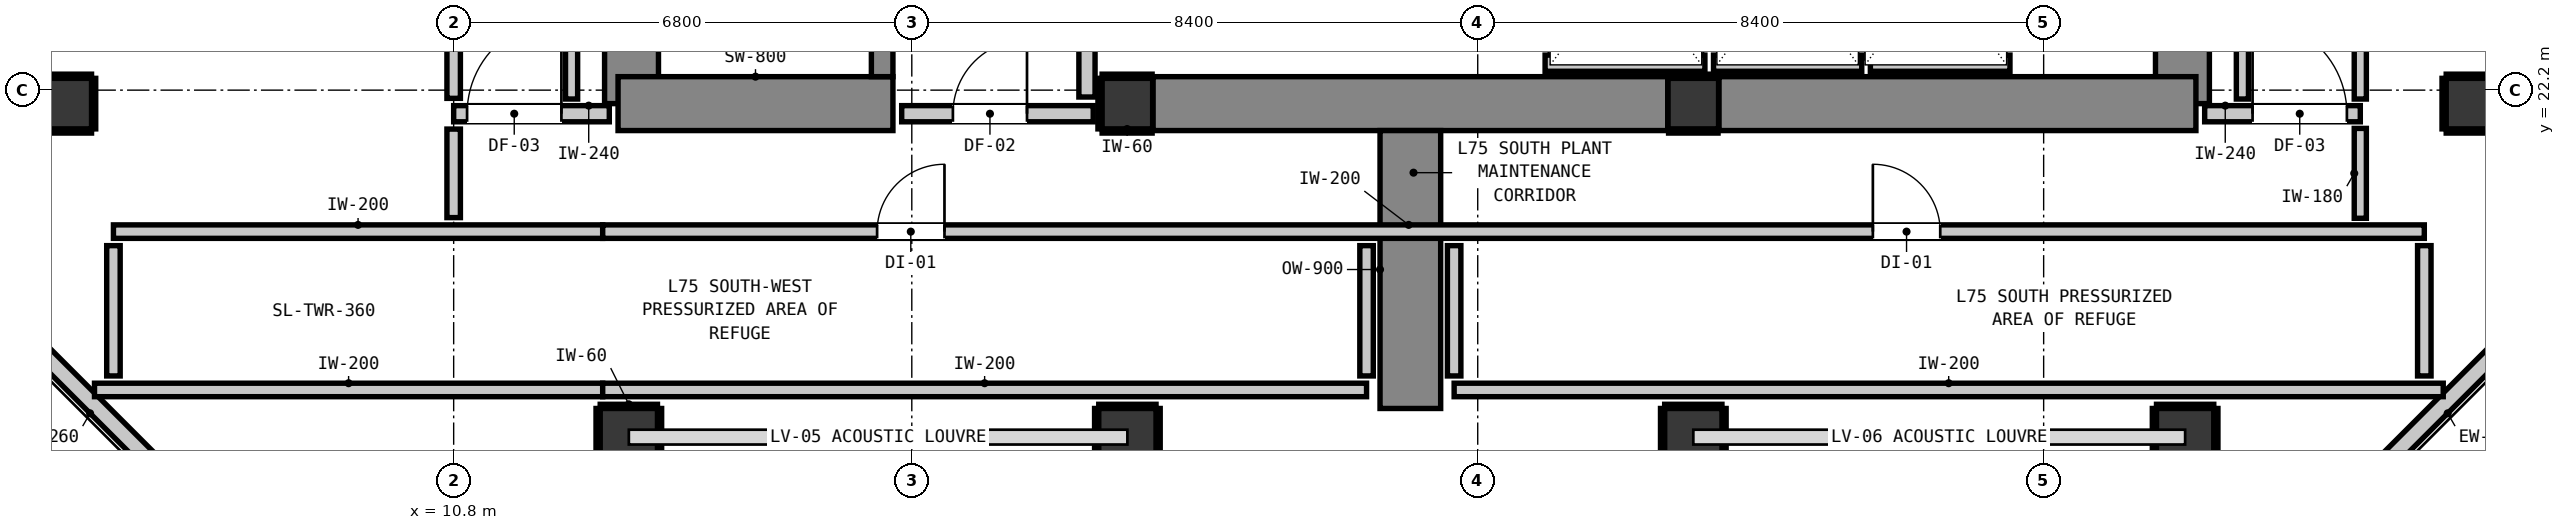
"""IFC4 building model, lengths in metres.
Left out: names, types, materials, properties, quantities, classifications, styles, units other than length and angle.
Written with IfcOpenShell. Run it as: python <this file> out.ifc"""

import sys

from ifc_helpers import new_model, si_unit, direction, frame, frame_2d, origin, origin_2d, place, context, subcontext, project, spatial, rectangle, extrude, element, fill, save


model = new_model("IFC4")
c1 = context("Model", 3, precision=1e-05, world=origin(), true_north=direction((0.0, 1.0)))
c2 = subcontext(c1, "Body", "Model", "MODEL_VIEW")
j1 = project(units=[si_unit("LENGTHUNIT", "METRE"), si_unit("PLANEANGLEUNIT", "RADIAN")], contexts=[c1])
p1 = place(None, origin())
s1 = spatial("IfcSite", under=j1, at=p1, CompositionType="ELEMENT")
p2 = place(p1, origin())
s2 = spatial("IfcBuilding", under=s1, at=p2, CompositionType="ELEMENT")
p3 = place(p2, frame((0.0, 0.0, 257.84)))
s3 = spatial("IfcBuildingStorey", under=s2, at=p3, CompositionType="ELEMENT", Elevation=257.84)
for number, where, z_axis, x_axis in (
    (1, (20.8, 22.0, 0.0), (0.0, 0.0, 1.0), (1.0, 0.0, 0.0)),
    (2, (29.2, 22.0, 0.0), (0.0, 0.0, 1.0), (1.0, 0.0, 0.0)),
):
    element("IfcColumn", number, at=place(p3, frame(where, z_axis=z_axis, x_axis=x_axis)), inside=s3, PredefinedType="COLUMN", context=c2, shape_type="SweptSolid", body=[
        extrude(rectangle(XDim=0.75, YDim=0.75, at=origin_2d()), origin(), (0.0, 0.0, 1.0), 4.4),
    ])
p4 = place(p3, frame((13.44, 22.0, 0.0), z_axis=(0.0, 0.0, 1.0), x_axis=(0.0, 1.0, 0.0)))
e3 = element("IfcWall", 3, at=p4, inside=s3, PredefinedType="SHEAR", context=c2, shape_type="SweptSolid", body=[
    extrude(rectangle(XDim=8.32, YDim=0.8, at=frame_2d((4.16, 0.0))), origin(), (0.0, 0.0, 1.0), 4.4),
])
p5 = place(p3, frame((13.24, 22.0, 0.0), z_axis=(0.0, 0.0, 1.0), x_axis=(1.0, 0.0, 0.0)))
e4 = element("IfcWall", 4, at=p5, inside=s3, PredefinedType="SHEAR", context=c2, shape_type="SweptSolid", body=[
    extrude(rectangle(XDim=4.08, YDim=0.8, at=frame_2d((2.04, 0.0))), origin(), (0.0, 0.0, 1.0), 4.4),
])
p6 = place(p3, frame((36.46, 22.0, 0.0), z_axis=(0.0, 0.0, 1.0), x_axis=(0.0, 1.0, 0.0)))
e5 = element("IfcWall", 5, at=p6, inside=s3, PredefinedType="SHEAR", context=c2, shape_type="SweptSolid", body=[
    extrude(rectangle(XDim=8.32, YDim=0.8, at=frame_2d((4.16, 0.0))), origin(), (0.0, 0.0, 1.0), 4.4),
])
p7 = place(p3, frame((29.58, 22.0, 0.0), z_axis=(0.0, 0.0, 1.0), x_axis=(1.0, 0.0, 0.0)))
e6 = element("IfcWall", 6, at=p7, inside=s3, PredefinedType="SHEAR", context=c2, shape_type="SweptSolid", body=[
    extrude(rectangle(XDim=7.08, YDim=0.8, at=frame_2d((3.54, 0.0))), origin(), (0.0, 0.0, 1.0), 4.4),
])
p8 = place(p3, frame((21.18, 22.0, 0.0), z_axis=(0.0, 0.0, 1.0), x_axis=(1.0, 0.0, 0.0)))
e7 = element("IfcWall", 7, at=p8, inside=s3, PredefinedType="SHEAR", context=c2, shape_type="SweptSolid", body=[
    extrude(rectangle(XDim=7.64, YDim=0.8, at=frame_2d((3.82, 0.0))), origin(), (0.0, 0.0, 1.0), 4.4),
])
p9 = place(p3, frame((17.16, 22.4, 0.0), z_axis=(0.0, 0.0, 1.0), x_axis=(0.0, 1.0, 0.0)))
e8 = element("IfcWall", 8, at=p9, inside=s3, PredefinedType="SHEAR", context=c2, shape_type="SweptSolid", body=[
    extrude(rectangle(XDim=8.0, YDim=0.32, at=frame_2d((4.0, 0.0))), origin(), (0.0, 0.0, 1.0), 4.4),
])
p10 = place(p9, frame((0.39, 0.0, 0.0)))
e9 = element("IfcOpeningElement", 9, at=p10, cuts=e8, PredefinedType="OPENING", context=c2, shape_type="SweptSolid", body=[
    extrude(rectangle(XDim=1.1, YDim=2.15, at=frame_2d((0.55, 1.075))), frame((0.0, 0.17, 0.0), z_axis=(0.0, -1.0, 0.0), x_axis=(1.0, 0.0, 0.0)), (0.0, 0.0, 1.0), 0.34),
])
for number, where, z_axis, x_axis in (
    (10, (13.4, 17.05, 0.0), (0.0, 0.0, 1.0), (1.0, 0.0, 0.0)),
    (11, (20.8, 17.05, 0.0), (0.0, 0.0, 1.0), (1.0, 0.0, 0.0)),
    (12, (29.2, 17.05, 0.0), (0.0, 0.0, 1.0), (1.0, 0.0, 0.0)),
    (13, (36.5, 17.05, 0.0), (0.0, 0.0, 1.0), (1.0, 0.0, 0.0)),
):
    element("IfcColumn", number, at=place(p3, frame(where, z_axis=z_axis, x_axis=x_axis)), inside=s3, PredefinedType="COLUMN", context=c2, shape_type="SweptSolid", body=[
        extrude(rectangle(XDim=0.85, YDim=0.85, at=origin_2d()), origin(), (0.0, 0.0, 1.0), 4.4),
    ])
for number, where, z_axis, x_axis in (
    (14, (5.05, 22.0, 0.0), (0.0, 0.0, 1.0), (1.0, 0.0, 0.0)),
    (15, (40.75, 22.0, 0.0), (0.0, 0.0, 1.0), (1.0, 0.0, 0.0)),
):
    element("IfcColumn", number, at=place(p3, frame(where, z_axis=z_axis, x_axis=x_axis)), inside=s3, PredefinedType="COLUMN", context=c2, shape_type="SweptSolid", body=[
        extrude(rectangle(XDim=0.75, YDim=0.75, at=origin_2d()), origin(), (0.0, 0.0, 1.0), 4.4),
    ])
p11 = place(p3, frame((25.0, 17.475, 0.0), z_axis=(0.0, 0.0, 1.0), x_axis=(0.0, 1.0, 0.0)))
e16 = element("IfcWall", 16, at=p11, inside=s3, PredefinedType="SHEAR", context=c2, shape_type="SweptSolid", body=[
    extrude(rectangle(XDim=4.125, YDim=0.9, at=frame_2d((2.062, 0.0))), origin(), (0.0, 0.0, 1.0), 4.18),
])
for number, where, z_axis, x_axis in (
    (17, (41.355, 18.545, 0.0), (0.0, 0.0, 1.0), (-0.707, -0.707, 0.0)),
    (18, (6.545, 16.445, 0.0), (0.0, 0.0, 1.0), (-0.707, 0.707, 0.0)),
):
    element("IfcWall", number, at=place(p3, frame(where, z_axis=z_axis, x_axis=x_axis)), inside=s3, PredefinedType="STANDARD", context=c2, shape_type="SweptSolid", body=[
        extrude(rectangle(XDim=2.97, YDim=0.26, at=frame_2d((1.485, 0.0))), origin(), (0.0, 0.0, 1.0), 4.18),
    ])
p12 = place(p3, frame((29.5, 22.6, 0.0), z_axis=(0.0, 0.0, 1.0), x_axis=(1.0, 0.0, 0.0)))
e19 = element("IfcWall", 19, at=p12, inside=s3, PredefinedType="PARTITIONING", context=c2, shape_type="SweptSolid", body=[
    extrude(rectangle(XDim=2.2, YDim=0.24, at=frame_2d((1.1, 0.0))), origin(), (0.0, 0.0, 1.0), 4.18),
])
p13 = place(p3, frame((31.828, 22.6, 0.0), z_axis=(0.0, 0.0, 1.0), x_axis=(1.0, 0.0, 0.0)))
e20 = element("IfcWall", 20, at=p13, inside=s3, PredefinedType="PARTITIONING", context=c2, shape_type="SweptSolid", body=[
    extrude(rectangle(XDim=2.072, YDim=0.24, at=frame_2d((1.036, 0.0))), origin(), (0.0, 0.0, 1.0), 4.18),
])
p14 = place(p3, frame((27.0, 22.6, 0.0), z_axis=(0.0, 0.0, 1.0), x_axis=(1.0, 0.0, 0.0)))
e21 = element("IfcWall", 21, at=p14, inside=s3, PredefinedType="PARTITIONING", context=c2, shape_type="SweptSolid", body=[
    extrude(rectangle(XDim=2.372, YDim=0.24, at=frame_2d((1.186, 0.0))), origin(), (0.0, 0.0, 1.0), 4.18),
])
p15 = place(p3, frame((10.8, 21.85, 0.0), z_axis=(0.0, 0.0, 1.0), x_axis=(1.0, 0.0, 0.0)))
e22 = element("IfcWall", 22, at=p15, inside=s3, PredefinedType="PARTITIONING", context=c2, shape_type="SweptSolid", body=[
    extrude(rectangle(XDim=2.31, YDim=0.24, at=frame_2d((1.155, 0.0))), origin(), (0.0, 0.0, 1.0), 3.807),
])
p16 = place(p15, frame((0.199, 0.0, 0.0)))
e23 = element("IfcOpeningElement", 23, at=p16, cuts=e22, PredefinedType="OPENING", context=c2, shape_type="SweptSolid", body=[
    extrude(rectangle(XDim=1.4, YDim=2.15, at=frame_2d((0.7, 1.075))), frame((0.0, 0.13, 0.0), z_axis=(0.0, -1.0, 0.0), x_axis=(1.0, 0.0, 0.0)), (0.0, 0.0, 1.0), 0.26),
])
p17 = place(p3, frame((17.45, 21.85, 0.0), z_axis=(0.0, 0.0, 1.0), x_axis=(1.0, 0.0, 0.0)))
e24 = element("IfcWall", 24, at=p17, inside=s3, PredefinedType="PARTITIONING", context=c2, shape_type="SweptSolid", body=[
    extrude(rectangle(XDim=2.843, YDim=0.24, at=frame_2d((1.421, 0.0))), origin(), (0.0, 0.0, 1.0), 3.807),
])
p18 = place(p17, frame((0.76, 0.0, 0.0)))
e25 = element("IfcOpeningElement", 25, at=p18, cuts=e24, PredefinedType="OPENING", context=c2, shape_type="SweptSolid", body=[
    extrude(rectangle(XDim=1.1, YDim=2.15, at=frame_2d((0.55, 1.075))), frame((0.0, 0.13, 0.0), z_axis=(0.0, -1.0, 0.0), x_axis=(1.0, 0.0, 0.0)), (0.0, 0.0, 1.0), 0.26),
])
p19 = place(p3, frame((36.79, 21.85, 0.0), z_axis=(0.0, 0.0, 1.0), x_axis=(1.0, 0.0, 0.0)))
e26 = element("IfcWall", 26, at=p19, inside=s3, PredefinedType="PARTITIONING", context=c2, shape_type="SweptSolid", body=[
    extrude(rectangle(XDim=2.31, YDim=0.24, at=frame_2d((1.155, 0.0))), origin(), (0.0, 0.0, 1.0), 3.807),
])
p20 = place(p19, frame((0.711, 0.0, 0.0)))
e27 = element("IfcOpeningElement", 27, at=p20, cuts=e26, PredefinedType="OPENING", context=c2, shape_type="SweptSolid", body=[
    extrude(rectangle(XDim=1.4, YDim=2.15, at=frame_2d((0.7, 1.075))), frame((0.0, 0.13, 0.0), z_axis=(0.0, -1.0, 0.0), x_axis=(1.0, 0.0, 0.0)), (0.0, 0.0, 1.0), 0.26),
])
p21 = place(p3, frame((5.469, 17.75, 0.0), z_axis=(0.0, 0.0, 1.0), x_axis=(1.0, 0.0, 0.0)))
e28 = element("IfcWall", 28, at=p21, inside=s3, PredefinedType="PARTITIONING", context=c2, shape_type="SweptSolid", body=[
    extrude(rectangle(XDim=7.543, YDim=0.2, at=frame_2d((3.771, 0.0))), origin(), (0.0, 0.0, 1.0), 3.557),
])
p22 = place(p3, frame((13.012, 17.75, 0.0), z_axis=(0.0, 0.0, 1.0), x_axis=(1.0, 0.0, 0.0)))
e29 = element("IfcWall", 29, at=p22, inside=s3, PredefinedType="PARTITIONING", context=c2, shape_type="SweptSolid", body=[
    extrude(rectangle(XDim=11.338, YDim=0.2, at=frame_2d((5.669, 0.0))), origin(), (0.0, 0.0, 1.0), 4.18),
])
p23 = place(p3, frame((25.65, 17.75, 0.0), z_axis=(0.0, 0.0, 1.0), x_axis=(1.0, 0.0, 0.0)))
e30 = element("IfcWall", 30, at=p23, inside=s3, PredefinedType="PARTITIONING", context=c2, shape_type="SweptSolid", body=[
    extrude(rectangle(XDim=14.681, YDim=0.2, at=frame_2d((7.341, 0.0))), origin(), (0.0, 0.0, 1.0), 4.18),
])
p24 = place(p3, frame((5.75, 20.1, 0.0), z_axis=(0.0, 0.0, 1.0), x_axis=(1.0, 0.0, 0.0)))
e31 = element("IfcWall", 31, at=p24, inside=s3, PredefinedType="PARTITIONING", context=c2, shape_type="SweptSolid", body=[
    extrude(rectangle(XDim=7.262, YDim=0.2, at=frame_2d((3.631, 0.0))), origin(), (0.0, 0.0, 1.0), 3.557),
])
p25 = place(p3, frame((13.012, 20.1, 0.0), z_axis=(0.0, 0.0, 1.0), x_axis=(1.0, 0.0, 0.0)))
e32 = element("IfcWall", 32, at=p25, inside=s3, PredefinedType="PARTITIONING", context=c2, shape_type="SweptSolid", body=[
    extrude(rectangle(XDim=27.038, YDim=0.2, at=frame_2d((13.519, 0.0))), origin(), (0.0, 0.0, 1.0), 4.18),
])
p26 = place(p25, frame((18.853, 0.0, 0.0)))
e33 = element("IfcOpeningElement", 33, at=p26, cuts=e32, PredefinedType="OPENING", context=c2, shape_type="SweptSolid", body=[
    extrude(rectangle(XDim=1.0, YDim=2.15, at=frame_2d((0.5, 1.075))), frame((0.0, 0.11, 0.0), z_axis=(0.0, -1.0, 0.0), x_axis=(1.0, 0.0, 0.0)), (0.0, 0.0, 1.0), 0.22),
])
p27 = place(p25, frame((4.073, 0.0, 0.0)))
e34 = element("IfcOpeningElement", 34, at=p27, cuts=e32, PredefinedType="OPENING", context=c2, shape_type="SweptSolid", body=[
    extrude(rectangle(XDim=1.0, YDim=2.15, at=frame_2d((0.5, 1.075))), frame((0.0, 0.11, 0.0), z_axis=(0.0, -1.0, 0.0), x_axis=(1.0, 0.0, 0.0)), (0.0, 0.0, 1.0), 0.22),
])
p28 = place(p3, frame((20.2, 22.098, 0.0), z_axis=(0.0, 0.0, 1.0), x_axis=(0.0, 1.0, 0.0)))
e35 = element("IfcWall", 35, at=p28, inside=s3, PredefinedType="PARTITIONING", context=c2, shape_type="SweptSolid", body=[
    extrude(rectangle(XDim=6.054, YDim=0.24, at=frame_2d((3.027, 0.0))), origin(), (0.0, 0.0, 1.0), 4.18),
])
p29 = place(p3, frame((5.75, 17.958, 0.0), z_axis=(0.0, 0.0, 1.0), x_axis=(0.0, 1.0, 0.0)))
e36 = element("IfcWall", 36, at=p29, inside=s3, PredefinedType="PARTITIONING", context=c2, shape_type="SweptSolid", body=[
    extrude(rectangle(XDim=1.934, YDim=0.2, at=frame_2d((0.967, 0.0))), origin(), (0.0, 0.0, 1.0), 4.18),
])
p30 = place(p3, frame((10.8, 20.308, 0.0), z_axis=(0.0, 0.0, 1.0), x_axis=(0.0, 1.0, 0.0)))
e37 = element("IfcWall", 37, at=p30, inside=s3, PredefinedType="PARTITIONING", context=c2, shape_type="SweptSolid", body=[
    extrude(rectangle(XDim=1.314, YDim=0.2, at=frame_2d((0.657, 0.0))), origin(), (0.0, 0.0, 1.0), 4.18),
])
p31 = place(p3, frame((10.8, 22.078, 0.0), z_axis=(0.0, 0.0, 1.0), x_axis=(0.0, 1.0, 0.0)))
e38 = element("IfcWall", 38, at=p31, inside=s3, PredefinedType="PARTITIONING", context=c2, shape_type="SweptSolid", body=[
    extrude(rectangle(XDim=0.914, YDim=0.2, at=frame_2d((0.457, 0.0))), origin(), (0.0, 0.0, 1.0), 4.18),
])
for number, where, z_axis, x_axis in (
    (39, (24.35, 17.958, 0.0), (0.0, 0.0, 1.0), (0.0, 1.0, 0.0)),
    (40, (25.65, 17.958, 0.0), (0.0, 0.0, 1.0), (0.0, 1.0, 0.0)),
    (41, (40.05, 17.958, 0.0), (0.0, 0.0, 1.0), (0.0, 1.0, 0.0)),
):
    element("IfcWall", number, at=place(p3, frame(where, z_axis=z_axis, x_axis=x_axis)), inside=s3, PredefinedType="PARTITIONING", context=c2, shape_type="SweptSolid", body=[
        extrude(rectangle(XDim=1.934, YDim=0.2, at=frame_2d((0.967, 0.0))), origin(), (0.0, 0.0, 1.0), 4.18),
    ])
for number, where, z_axis, x_axis in (
    (42, (12.55, 22.068, 0.0), (0.0, 0.0, 1.0), (0.0, 1.0, 0.0)),
    (43, (37.35, 22.068, 0.0), (0.0, 0.0, 1.0), (0.0, 1.0, 0.0)),
):
    element("IfcWall", number, at=place(p3, frame(where, z_axis=z_axis, x_axis=x_axis)), inside=s3, PredefinedType="PARTITIONING", context=c2, shape_type="SweptSolid", body=[
        extrude(rectangle(XDim=17.294, YDim=0.18, at=frame_2d((8.647, 0.0))), origin(), (0.0, 0.0, 1.0), 4.18),
    ])
p32 = place(p3, frame((39.1, 20.298, 0.0), z_axis=(0.0, 0.0, 1.0), x_axis=(0.0, 1.0, 0.0)))
e44 = element("IfcWall", 44, at=p32, inside=s3, PredefinedType="PARTITIONING", context=c2, shape_type="SweptSolid", body=[
    extrude(rectangle(XDim=1.334, YDim=0.18, at=frame_2d((0.667, 0.0))), origin(), (0.0, 0.0, 1.0), 4.18),
])
p33 = place(p3, frame((39.1, 22.068, 0.0), z_axis=(0.0, 0.0, 1.0), x_axis=(0.0, 1.0, 0.0)))
e45 = element("IfcWall", 45, at=p33, inside=s3, PredefinedType="PARTITIONING", context=c2, shape_type="SweptSolid", body=[
    extrude(rectangle(XDim=17.294, YDim=0.18, at=frame_2d((8.647, 0.0))), origin(), (0.0, 0.0, 1.0), 4.18),
])
for number, where, z_axis, x_axis in (
    (46, (20.425, 21.593, 0.0), (0.0, 0.0, 1.0), (1.0, 0.0, 0.0)),
    (47, (20.425, 22.407, 0.0), (0.0, 0.0, 1.0), (1.0, 0.0, 0.0)),
):
    element("IfcWall", number, at=place(p3, frame(where, z_axis=z_axis, x_axis=x_axis)), inside=s3, PredefinedType="PARTITIONING", context=c2, shape_type="SweptSolid", body=[
        extrude(rectangle(XDim=0.742, YDim=0.06, at=frame_2d((0.371, 0.0))), origin(), (0.0, 0.0, 1.0), 1.45),
    ])
p34 = place(p3, frame((20.393, 21.625, 0.0), z_axis=(0.0, 0.0, 1.0), x_axis=(0.0, 1.0, 0.0)))
e48 = element("IfcWall", 48, at=p34, inside=s3, PredefinedType="PARTITIONING", context=c2, shape_type="SweptSolid", body=[
    extrude(rectangle(XDim=0.75, YDim=0.06, at=frame_2d((0.375, 0.0))), origin(), (0.0, 0.0, 1.0), 1.45),
])
for number, where, z_axis, x_axis in (
    (49, (28.833, 21.593, 0.0), (0.0, 0.0, 1.0), (1.0, 0.0, 0.0)),
    (50, (28.833, 22.407, 0.0), (0.0, 0.0, 1.0), (1.0, 0.0, 0.0)),
):
    element("IfcWall", number, at=place(p3, frame(where, z_axis=z_axis, x_axis=x_axis)), inside=s3, PredefinedType="PARTITIONING", context=c2, shape_type="SweptSolid", body=[
        extrude(rectangle(XDim=0.734, YDim=0.06, at=frame_2d((0.367, 0.0))), origin(), (0.0, 0.0, 1.0), 1.45),
    ])
p35 = place(p3, frame((12.975, 17.507, 0.0), z_axis=(0.0, 0.0, 1.0), x_axis=(1.0, 0.0, 0.0)))
e51 = element("IfcWall", 51, at=p35, inside=s3, PredefinedType="PARTITIONING", context=c2, shape_type="SweptSolid", body=[
    extrude(rectangle(XDim=0.85, YDim=0.06, at=frame_2d((0.425, 0.0))), origin(), (0.0, 0.0, 1.0), 1.45),
])
for number, where, z_axis, x_axis in (
    (52, (12.943, 16.625, 0.0), (0.0, 0.0, 1.0), (0.0, 1.0, 0.0)),
    (53, (13.857, 16.625, 0.0), (0.0, 0.0, 1.0), (0.0, 1.0, 0.0)),
    (54, (20.375, 17.507, 0.0), (0.0, 0.0, 1.0), (1.0, 0.0, 0.0)),
    (55, (20.343, 16.625, 0.0), (0.0, 0.0, 1.0), (0.0, 1.0, 0.0)),
    (56, (21.257, 16.625, 0.0), (0.0, 0.0, 1.0), (0.0, 1.0, 0.0)),
    (57, (28.775, 17.507, 0.0), (0.0, 0.0, 1.0), (1.0, 0.0, 0.0)),
    (58, (28.743, 16.625, 0.0), (0.0, 0.0, 1.0), (0.0, 1.0, 0.0)),
    (59, (29.657, 16.625, 0.0), (0.0, 0.0, 1.0), (0.0, 1.0, 0.0)),
    (60, (36.075, 17.507, 0.0), (0.0, 0.0, 1.0), (1.0, 0.0, 0.0)),
    (61, (36.043, 16.625, 0.0), (0.0, 0.0, 1.0), (0.0, 1.0, 0.0)),
    (62, (36.957, 16.625, 0.0), (0.0, 0.0, 1.0), (0.0, 1.0, 0.0)),
):
    element("IfcWall", number, at=place(p3, frame(where, z_axis=z_axis, x_axis=x_axis)), inside=s3, PredefinedType="PARTITIONING", context=c2, shape_type="SweptSolid", body=[
        extrude(rectangle(XDim=0.85, YDim=0.06, at=frame_2d((0.425, 0.0))), origin(), (0.0, 0.0, 1.0), 1.45),
    ])
for number, where, z_axis, x_axis in (
    (63, (4.675, 21.593, 0.0), (0.0, 0.0, 1.0), (1.0, 0.0, 0.0)),
    (64, (4.675, 22.407, 0.0), (0.0, 0.0, 1.0), (1.0, 0.0, 0.0)),
    (65, (5.457, 21.625, 0.0), (0.0, 0.0, 1.0), (0.0, 1.0, 0.0)),
    (66, (40.375, 21.593, 0.0), (0.0, 0.0, 1.0), (1.0, 0.0, 0.0)),
    (67, (40.375, 22.407, 0.0), (0.0, 0.0, 1.0), (1.0, 0.0, 0.0)),
    (68, (40.343, 21.625, 0.0), (0.0, 0.0, 1.0), (0.0, 1.0, 0.0)),
):
    element("IfcWall", number, at=place(p3, frame(where, z_axis=z_axis, x_axis=x_axis)), inside=s3, PredefinedType="PARTITIONING", context=c2, shape_type="SweptSolid", body=[
        extrude(rectangle(XDim=0.75, YDim=0.06, at=frame_2d((0.375, 0.0))), origin(), (0.0, 0.0, 1.0), 1.45),
    ])
p36 = place(p18, origin())
e69 = element("IfcDoor", 69, at=p36, inside=s3, OperationType="SINGLE_SWING_RIGHT", PredefinedType="DOOR", context=c2, shape_type="SweptSolid", body=[
    extrude(rectangle(XDim=1.1, YDim=2.15, at=frame_2d((0.55, 1.075))), frame((0.0, 0.025, 0.0), z_axis=(0.0, -1.0, 0.0), x_axis=(1.0, 0.0, 0.0)), (0.0, 0.0, 1.0), 0.05),
])
fill(e25, e69)
p37 = place(p16, origin())
e70 = element("IfcDoor", 70, at=p37, inside=s3, OperationType="SINGLE_SWING_RIGHT", PredefinedType="DOOR", context=c2, shape_type="SweptSolid", body=[
    extrude(rectangle(XDim=1.4, YDim=2.15, at=frame_2d((0.7, 1.075))), frame((0.0, 0.025, 0.0), z_axis=(0.0, -1.0, 0.0), x_axis=(1.0, 0.0, 0.0)), (0.0, 0.0, 1.0), 0.05),
])
fill(e23, e70)
p38 = place(p20, origin())
e71 = element("IfcDoor", 71, at=p38, inside=s3, OperationType="SINGLE_SWING_LEFT", PredefinedType="DOOR", context=c2, shape_type="SweptSolid", body=[
    extrude(rectangle(XDim=1.4, YDim=2.15, at=frame_2d((0.7, 1.075))), frame((0.0, 0.025, 0.0), z_axis=(0.0, -1.0, 0.0), x_axis=(1.0, 0.0, 0.0)), (0.0, 0.0, 1.0), 0.05),
])
fill(e27, e71)
p39 = place(p26, origin())
e72 = element("IfcDoor", 72, at=p39, inside=s3, OperationType="SINGLE_SWING_LEFT", PredefinedType="DOOR", context=c2, shape_type="SweptSolid", body=[
    extrude(rectangle(XDim=1.0, YDim=2.15, at=frame_2d((0.5, 1.075))), frame((0.0, 0.025, 0.0), z_axis=(0.0, -1.0, 0.0), x_axis=(1.0, 0.0, 0.0)), (0.0, 0.0, 1.0), 0.05),
])
fill(e33, e72)
p40 = place(p27, origin())
e73 = element("IfcDoor", 73, at=p40, inside=s3, OperationType="SINGLE_SWING_RIGHT", PredefinedType="DOOR", context=c2, shape_type="SweptSolid", body=[
    extrude(rectangle(XDim=1.0, YDim=2.15, at=frame_2d((0.5, 1.075))), frame((0.0, 0.025, 0.0), z_axis=(0.0, -1.0, 0.0), x_axis=(1.0, 0.0, 0.0)), (0.0, 0.0, 1.0), 0.05),
])
fill(e34, e73)
save(model, sys.argv[1])
